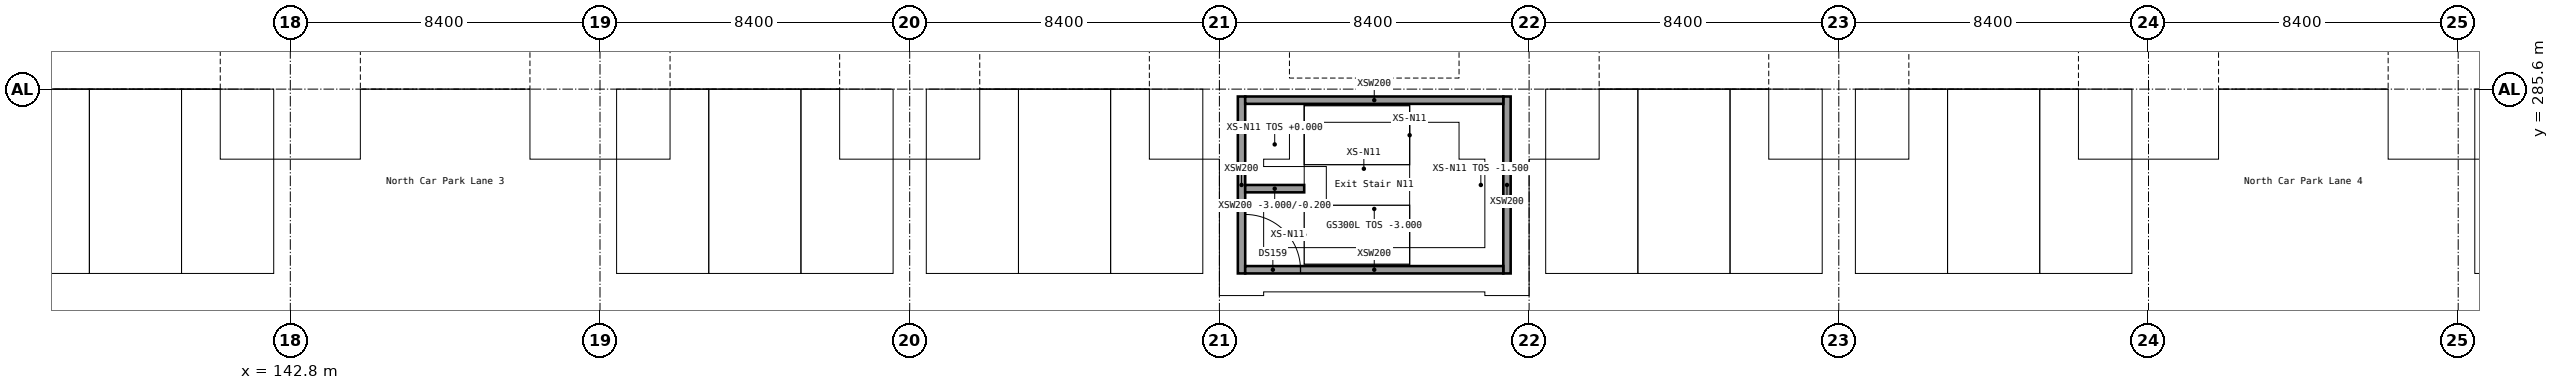
"""IFC4 building model, lengths in metres.
Left out: names, types, materials, properties, quantities, classifications, styles, units other than length and angle.
Written with IfcOpenShell. Run it as: python <this file> out.ifc"""

import sys

from ifc_helpers import new_model, si_unit, direction, frame, frame_2d, origin, origin_2d, place, context, subcontext, project, spatial, rectangle, extrude, element, fill, save


model = new_model("IFC4")
c1 = context("Model", 3, precision=1e-05, world=origin(), true_north=direction((0.0, 1.0)))
c2 = subcontext(c1, "Body", "Model", "MODEL_VIEW")
j1 = project(units=[si_unit("LENGTHUNIT", "METRE"), si_unit("PLANEANGLEUNIT", "RADIAN")], contexts=[c1])
p1 = place(None, origin())
s1 = spatial("IfcSite", under=j1, at=p1, CompositionType="ELEMENT")
p2 = place(p1, origin())
s2 = spatial("IfcBuilding", under=s1, at=p2, CompositionType="ELEMENT")
p3 = place(p2, frame((0.0, 0.0, -3.0)))
s3 = spatial("IfcBuildingStorey", under=s2, at=p3, CompositionType="ELEMENT", Elevation=-3.0)
for number, where, z_axis, x_axis in (
    (1, (168.6, 280.6, 0.0), (0.0, 0.0, 1.0), (0.0, 1.0, 0.0)),
    (2, (175.8, 280.6, 0.0), (0.0, 0.0, 1.0), (0.0, 1.0, 0.0)),
):
    element("IfcWall", number, at=place(p3, frame(where, z_axis=z_axis, x_axis=x_axis)), inside=s3, PredefinedType="SOLIDWALL", context=c2, shape_type="SweptSolid", body=[
        extrude(rectangle(XDim=4.8, YDim=0.2, at=frame_2d((2.4, 0.0))), origin(), (0.0, 0.0, 1.0), 3.0),
    ])
p4 = place(p3, frame((168.7, 280.7, 0.0), z_axis=(0.0, 0.0, 1.0), x_axis=(1.0, 0.0, 0.0)))
e3 = element("IfcWall", 3, at=p4, inside=s3, PredefinedType="SOLIDWALL", context=c2, shape_type="SweptSolid", body=[
    extrude(rectangle(XDim=7.0, YDim=0.2, at=frame_2d((3.5, 0.0))), origin(), (0.0, 0.0, 1.0), 3.0),
])
p5 = place(p4, origin())
e4 = element("IfcOpeningElement", 4, at=p5, cuts=e3, PredefinedType="OPENING", context=c2, shape_type="SweptSolid", body=[
    extrude(rectangle(XDim=1.5, YDim=2.1, at=frame_2d((0.75, 1.05))), frame((0.0, 0.1, 0.0), z_axis=(0.0, -1.0, 0.0), x_axis=(1.0, 0.0, 0.0)), (0.0, 0.0, 1.0), 0.2),
])
p6 = place(p3, frame((168.7, 285.3, 0.0), z_axis=(0.0, 0.0, 1.0), x_axis=(1.0, 0.0, 0.0)))
e5 = element("IfcWall", 5, at=p6, inside=s3, PredefinedType="SOLIDWALL", context=c2, shape_type="SweptSolid", body=[
    extrude(rectangle(XDim=7.0, YDim=0.2, at=frame_2d((3.5, 0.0))), origin(), (0.0, 0.0, 1.0), 3.0),
])
p7 = place(p3, frame((168.7, 282.9, 0.0), z_axis=(0.0, 0.0, 1.0), x_axis=(1.0, 0.0, 0.0)))
e6 = element("IfcWall", 6, at=p7, inside=s3, PredefinedType="SOLIDWALL", context=c2, shape_type="SweptSolid", body=[
    extrude(rectangle(XDim=1.6, YDim=0.2, at=frame_2d((0.8, 0.0))), origin(), (0.0, 0.0, 1.0), 2.8),
])
for number, where, z_axis, x_axis in (
    (7, (142.8, 285.6, 0.0), (0.0, 0.0, 1.0), (1.0, 0.0, 0.0)),
    (8, (151.2, 285.6, 0.0), (0.0, 0.0, 1.0), (1.0, 0.0, 0.0)),
    (9, (159.6, 285.6, 0.0), (0.0, 0.0, 1.0), (1.0, 0.0, 0.0)),
    (10, (168.0, 285.6, 0.0), (0.0, 0.0, 1.0), (1.0, 0.0, 0.0)),
    (11, (176.4, 285.6, 0.0), (0.0, 0.0, 1.0), (1.0, 0.0, 0.0)),
    (12, (184.8, 285.6, 0.0), (0.0, 0.0, 1.0), (1.0, 0.0, 0.0)),
    (13, (193.2, 285.6, 0.0), (0.0, 0.0, 1.0), (1.0, 0.0, 0.0)),
    (14, (201.6, 285.6, 0.0), (0.0, 0.0, 1.0), (1.0, 0.0, 0.0)),
):
    element("IfcColumn", number, at=place(p3, frame(where, z_axis=z_axis, x_axis=x_axis)), inside=s3, PredefinedType="COLUMN", context=c2, shape_type="SweptSolid", body=[
        extrude(rectangle(XDim=0.8, YDim=0.8, at=origin_2d()), origin(), (0.0, 0.0, 1.0), 2.4),
    ])
p8 = place(p5, origin())
e15 = element("IfcDoor", 15, at=p8, inside=s3, OperationType="SINGLE_SWING_LEFT", PredefinedType="DOOR", context=c2, shape_type="SweptSolid", body=[
    extrude(rectangle(XDim=1.5, YDim=2.1, at=frame_2d((0.75, 1.05))), frame((0.0, 0.025, 0.0), z_axis=(0.0, -1.0, 0.0), x_axis=(1.0, 0.0, 0.0)), (0.0, 0.0, 1.0), 0.05),
])
fill(e4, e15)
save(model, sys.argv[1])
